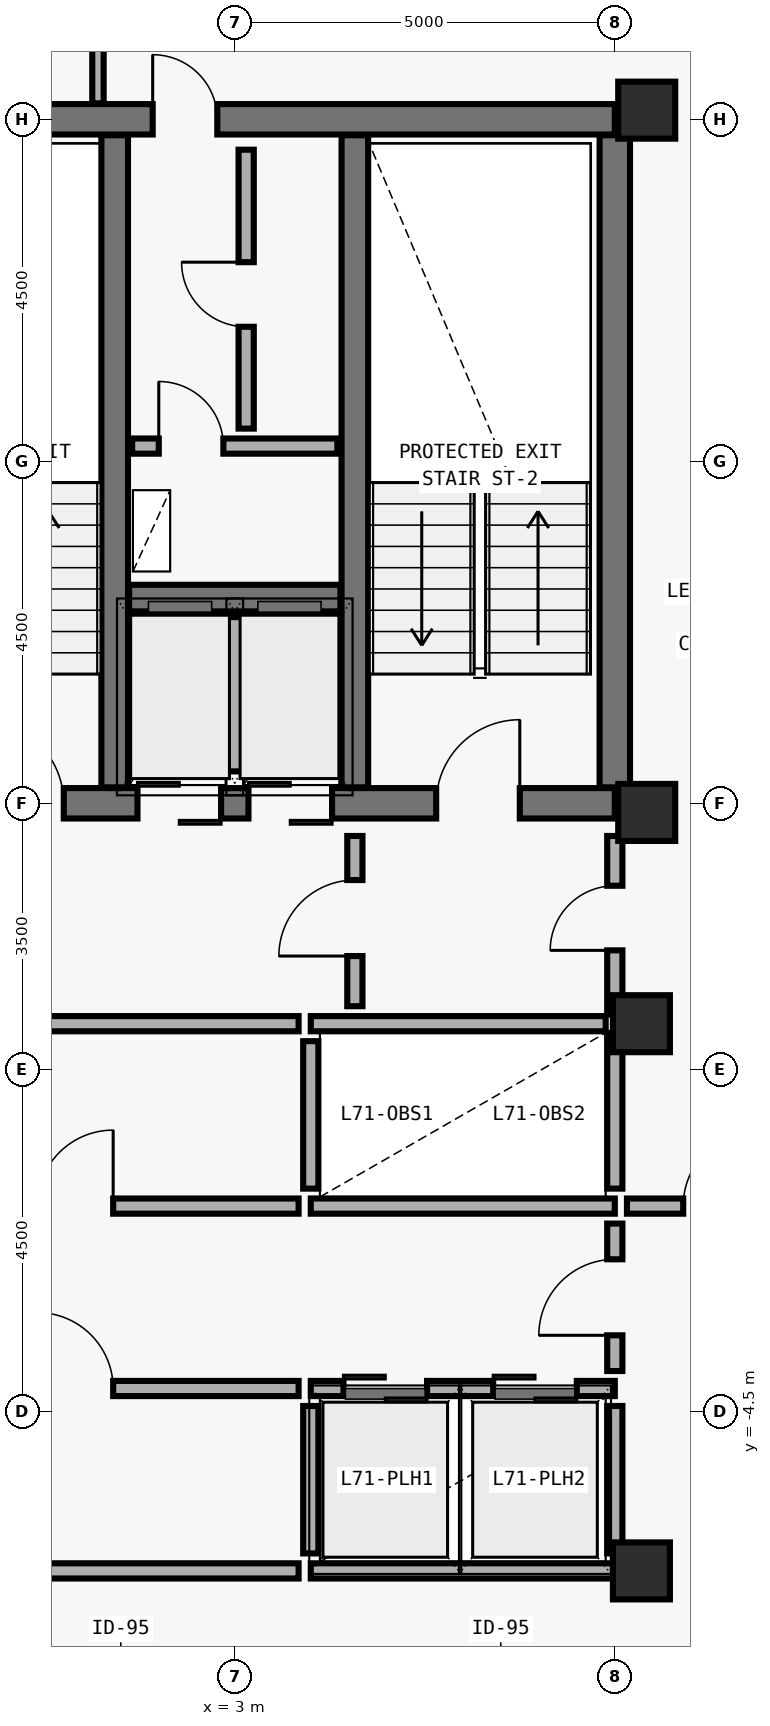
"""IFC4 building model, lengths in metres.
Left out: names, types, materials, properties, quantities, classifications, styles, units other than length and angle.
Written with IfcOpenShell. Run it as: python <this file> out.ifc"""

import sys

from ifc_helpers import new_model, si_unit, direction, frame, frame_2d, origin, origin_2d, place, context, subcontext, project, spatial, rectangle, extrude, element, fill, save


model = new_model("IFC4")
c1 = context("Model", 3, precision=1e-05, world=origin(), true_north=direction((0.0, 1.0)))
c2 = subcontext(c1, "Body", "Model", "MODEL_VIEW")
j1 = project(units=[si_unit("LENGTHUNIT", "METRE"), si_unit("PLANEANGLEUNIT", "RADIAN")], contexts=[c1])
p1 = place(None, origin())
s1 = spatial("IfcSite", under=j1, at=p1, CompositionType="ELEMENT")
p2 = place(p1, origin())
s2 = spatial("IfcBuilding", under=s1, at=p2, CompositionType="ELEMENT")
p3 = place(p2, frame((0.0, 0.0, 277.8)))
s3 = spatial("IfcBuildingStorey", under=s2, at=p3, CompositionType="ELEMENT", Elevation=277.8)
p4 = place(p3, frame((-2.0, 3.5, 0.0), z_axis=(0.0, 0.0, 1.0), x_axis=(1.0, 0.0, 0.0)))
e1 = element("IfcWall", 1, at=p4, inside=s3, PredefinedType="SHEAR", context=c2, shape_type="SweptSolid", body=[
    extrude(rectangle(XDim=10.0, YDim=0.4, at=frame_2d((5.0, 0.0))), origin(), (0.0, 0.0, 1.0), 3.592),
])
p5 = place(p4, frame((1.65, 0.0, 0.0)))
e2 = element("IfcOpeningElement", 2, at=p5, cuts=e1, PredefinedType="OPENING", context=c2, shape_type="SweptSolid", body=[
    extrude(rectangle(XDim=1.1, YDim=2.15, at=frame_2d((0.55, 1.075))), frame((0.0, 0.21, 0.0), z_axis=(0.0, -1.0, 0.0), x_axis=(1.0, 0.0, 0.0)), (0.0, 0.0, 1.0), 0.42),
])
p6 = place(p4, frame((7.65, 0.0, 0.0)))
e3 = element("IfcOpeningElement", 3, at=p6, cuts=e1, PredefinedType="OPENING", context=c2, shape_type="SweptSolid", body=[
    extrude(rectangle(XDim=1.1, YDim=2.15, at=frame_2d((0.55, 1.075))), frame((0.0, 0.21, 0.0), z_axis=(0.0, -1.0, 0.0), x_axis=(1.0, 0.0, 0.0)), (0.0, 0.0, 1.0), 0.42),
])
p7 = place(p4, frame((3.72, 0.0, 0.0)))
e4 = element("IfcOpeningElement", 4, at=p7, cuts=e1, PredefinedType="OPENING", context=c2, shape_type="SweptSolid", body=[
    extrude(rectangle(XDim=1.1, YDim=2.2, at=frame_2d((0.55, 1.1))), frame((0.0, 0.21, 0.0), z_axis=(0.0, -1.0, 0.0), x_axis=(1.0, 0.0, 0.0)), (0.0, 0.0, 1.0), 0.42),
])
p8 = place(p4, frame((5.18, 0.0, 0.0)))
e5 = element("IfcOpeningElement", 5, at=p8, cuts=e1, PredefinedType="OPENING", context=c2, shape_type="SweptSolid", body=[
    extrude(rectangle(XDim=1.1, YDim=2.2, at=frame_2d((0.55, 1.1))), frame((0.0, 0.21, 0.0), z_axis=(0.0, -1.0, 0.0), x_axis=(1.0, 0.0, 0.0)), (0.0, 0.0, 1.0), 0.42),
])
p9 = place(p3, frame((-2.0, 12.5, 0.0), z_axis=(0.0, 0.0, 1.0), x_axis=(1.0, 0.0, 0.0)))
e6 = element("IfcWall", 6, at=p9, inside=s3, PredefinedType="SHEAR", context=c2, shape_type="SweptSolid", body=[
    extrude(rectangle(XDim=10.0, YDim=0.4, at=frame_2d((5.0, 0.0))), origin(), (0.0, 0.0, 1.0), 3.592),
])
p10 = place(p9, frame((3.92, 0.0, 0.0)))
e7 = element("IfcOpeningElement", 7, at=p10, cuts=e6, PredefinedType="OPENING", context=c2, shape_type="SweptSolid", body=[
    extrude(rectangle(XDim=0.85, YDim=2.1, at=frame_2d((0.425, 1.05))), frame((0.0, 0.21, 0.0), z_axis=(0.0, -1.0, 0.0), x_axis=(1.0, 0.0, 0.0)), (0.0, 0.0, 1.0), 0.42),
])
p11 = place(p3, frame((8.0, 3.71, 0.0), z_axis=(0.0, 0.0, 1.0), x_axis=(0.0, 1.0, 0.0)))
e8 = element("IfcWall", 8, at=p11, inside=s3, PredefinedType="SHEAR", context=c2, shape_type="SweptSolid", body=[
    extrude(rectangle(XDim=8.58, YDim=0.4, at=frame_2d((4.29, 0.0))), origin(), (0.0, 0.0, 1.0), 3.592),
])
for number, where, z_axis, x_axis in (
    (9, (1.42, 3.71, 0.0), (0.0, 0.0, 1.0), (0.0, 1.0, 0.0)),
    (10, (4.58, 3.71, 0.0), (0.0, 0.0, 1.0), (0.0, 1.0, 0.0)),
):
    element("IfcWall", number, at=place(p3, frame(where, z_axis=z_axis, x_axis=x_axis)), inside=s3, PredefinedType="SHEAR", context=c2, shape_type="SweptSolid", body=[
        extrude(rectangle(XDim=8.58, YDim=0.35, at=frame_2d((4.29, 0.0))), origin(), (0.0, 0.0, 1.0), 3.592),
    ])
p12 = place(p3, frame((1.61, 6.2, 0.0), z_axis=(0.0, 0.0, 1.0), x_axis=(1.0, 0.0, 0.0)))
e11 = element("IfcWall", 11, at=p12, inside=s3, PredefinedType="SHEAR", context=c2, shape_type="SweptSolid", body=[
    extrude(rectangle(XDim=2.78, YDim=0.35, at=frame_2d((1.39, 0.0))), origin(), (0.0, 0.0, 1.0), 3.592),
])
for number, where, z_axis, x_axis in (
    (12, (8.42, 12.62, 0.0), (0.0, 0.0, 1.0), (1.0, 0.0, 0.0)),
    (13, (8.42, 3.38, 0.0), (0.0, 0.0, 1.0), (1.0, 0.0, 0.0)),
    (14, (8.35, 0.6, 0.0), (0.0, 0.0, 1.0), (1.0, 0.0, 0.0)),
    (15, (8.35, -6.6, 0.0), (0.0, 0.0, 1.0), (1.0, 0.0, 0.0)),
):
    element("IfcColumn", number, at=place(p3, frame(where, z_axis=z_axis, x_axis=x_axis)), inside=s3, PredefinedType="COLUMN", context=c2, shape_type="SweptSolid", body=[
        extrude(rectangle(XDim=0.75, YDim=0.75, at=origin_2d()), origin(), (0.0, 0.0, 1.0), 3.575),
    ])
p13 = place(p3, frame((3.0, 3.92, 0.0), z_axis=(0.0, 0.0, 1.0), x_axis=(0.0, 1.0, 0.0)))
e16 = element("IfcWall", 16, at=p13, inside=s3, PredefinedType="SOLIDWALL", context=c2, shape_type="SweptSolid", body=[
    extrude(rectangle(XDim=2.03, YDim=0.2, at=frame_2d((1.015, 0.0))), origin(), (0.0, 0.0, 1.0), 3.36),
])
p14 = place(p3, frame((4.0, 0.6, 0.0), z_axis=(0.0, 0.0, 1.0), x_axis=(1.0, 0.0, 0.0)))
e17 = element("IfcWall", 17, at=p14, inside=s3, PredefinedType="SOLIDWALL", context=c2, shape_type="SweptSolid", body=[
    extrude(rectangle(XDim=3.88, YDim=0.2, at=frame_2d((1.94, 0.0))), origin(), (0.0, 0.0, 1.0), 3.072),
])
p15 = place(p3, frame((4.0, -1.8, 0.0), z_axis=(0.0, 0.0, 1.0), x_axis=(1.0, 0.0, 0.0)))
e18 = element("IfcWall", 18, at=p15, inside=s3, PredefinedType="SOLIDWALL", context=c2, shape_type="SweptSolid", body=[
    extrude(rectangle(XDim=4.0, YDim=0.2, at=frame_2d((2.0, 0.0))), origin(), (0.0, 0.0, 1.0), 3.36),
])
p16 = place(p3, frame((4.0, -1.57, 0.0), z_axis=(0.0, 0.0, 1.0), x_axis=(0.0, 1.0, 0.0)))
e19 = element("IfcWall", 19, at=p16, inside=s3, PredefinedType="SOLIDWALL", context=c2, shape_type="SweptSolid", body=[
    extrude(rectangle(XDim=1.94, YDim=0.2, at=frame_2d((0.97, 0.0))), origin(), (0.0, 0.0, 1.0), 3.36),
])
p17 = place(p3, frame((8.0, -1.57, 0.0), z_axis=(0.0, 0.0, 1.0), x_axis=(0.0, 1.0, 0.0)))
e20 = element("IfcWall", 20, at=p17, inside=s3, PredefinedType="SOLIDWALL", context=c2, shape_type="SweptSolid", body=[
    extrude(rectangle(XDim=2.05, YDim=0.2, at=frame_2d((1.025, 0.0))), origin(), (0.0, 0.0, 1.0), 3.072),
])
p18 = place(p3, frame((4.0, -4.2, 0.0), z_axis=(0.0, 0.0, 1.0), x_axis=(1.0, 0.0, 0.0)))
e21 = element("IfcWall", 21, at=p18, inside=s3, PredefinedType="SOLIDWALL", context=c2, shape_type="SweptSolid", body=[
    extrude(rectangle(XDim=4.0, YDim=0.2, at=frame_2d((2.0, 0.0))), origin(), (0.0, 0.0, 1.0), 3.36),
])
p19 = place(p18, frame((0.43, 0.0, 0.0)))
e22 = element("IfcOpeningElement", 22, at=p19, cuts=e21, PredefinedType="OPENING", context=c2, shape_type="SweptSolid", body=[
    extrude(rectangle(XDim=1.1, YDim=2.2, at=frame_2d((0.55, 1.1))), frame((0.0, 0.11, 0.0), z_axis=(0.0, -1.0, 0.0), x_axis=(1.0, 0.0, 0.0)), (0.0, 0.0, 1.0), 0.22),
])
p20 = place(p18, frame((2.4, 0.0, 0.0)))
e23 = element("IfcOpeningElement", 23, at=p20, cuts=e21, PredefinedType="OPENING", context=c2, shape_type="SweptSolid", body=[
    extrude(rectangle(XDim=1.1, YDim=2.2, at=frame_2d((0.55, 1.1))), frame((0.0, 0.11, 0.0), z_axis=(0.0, -1.0, 0.0), x_axis=(1.0, 0.0, 0.0)), (0.0, 0.0, 1.0), 0.22),
])
p21 = place(p3, frame((4.0, -6.6, 0.0), z_axis=(0.0, 0.0, 1.0), x_axis=(1.0, 0.0, 0.0)))
e24 = element("IfcWall", 24, at=p21, inside=s3, PredefinedType="SOLIDWALL", context=c2, shape_type="SweptSolid", body=[
    extrude(rectangle(XDim=4.0, YDim=0.2, at=frame_2d((2.0, 0.0))), origin(), (0.0, 0.0, 1.0), 3.072),
])
p22 = place(p3, frame((4.0, -6.37, 0.0), z_axis=(0.0, 0.0, 1.0), x_axis=(0.0, 1.0, 0.0)))
e25 = element("IfcWall", 25, at=p22, inside=s3, PredefinedType="SOLIDWALL", context=c2, shape_type="SweptSolid", body=[
    extrude(rectangle(XDim=1.94, YDim=0.2, at=frame_2d((0.97, 0.0))), origin(), (0.0, 0.0, 1.0), 3.36),
])
p23 = place(p3, frame((8.0, -6.37, 0.0), z_axis=(0.0, 0.0, 1.0), x_axis=(0.0, 1.0, 0.0)))
e26 = element("IfcWall", 26, at=p23, inside=s3, PredefinedType="SOLIDWALL", context=c2, shape_type="SweptSolid", body=[
    extrude(rectangle(XDim=1.94, YDim=0.2, at=frame_2d((0.97, 0.0))), origin(), (0.0, 0.0, 1.0), 3.072),
])
p24 = place(p3, frame((1.65, 8.2, 0.0), z_axis=(0.0, 0.0, 1.0), x_axis=(1.0, 0.0, 0.0)))
e27 = element("IfcWall", 27, at=p24, inside=s3, PredefinedType="MOVABLE", context=c2, shape_type="SweptSolid", body=[
    extrude(rectangle(XDim=2.7, YDim=0.2, at=frame_2d((1.35, 0.0))), origin(), (0.0, 0.0, 1.0), 3.36),
])
p25 = place(p24, frame((0.35, 0.0, 0.0)))
e28 = element("IfcOpeningElement", 28, at=p25, cuts=e27, PredefinedType="OPENING", context=c2, shape_type="SweptSolid", body=[
    extrude(rectangle(XDim=0.85, YDim=2.1, at=frame_2d((0.425, 1.05))), frame((0.0, 0.11, 0.0), z_axis=(0.0, -1.0, 0.0), x_axis=(1.0, 0.0, 0.0)), (0.0, 0.0, 1.0), 0.22),
])
p26 = place(p3, frame((3.15, 8.43, 0.0), z_axis=(0.0, 0.0, 1.0), x_axis=(0.0, 1.0, 0.0)))
e29 = element("IfcWall", 29, at=p26, inside=s3, PredefinedType="MOVABLE", context=c2, shape_type="SweptSolid", body=[
    extrude(rectangle(XDim=3.67, YDim=0.2, at=frame_2d((1.835, 0.0))), origin(), (0.0, 0.0, 1.0), 3.36),
])
p27 = place(p26, frame((1.34, 0.0, 0.0)))
e30 = element("IfcOpeningElement", 30, at=p27, cuts=e29, PredefinedType="OPENING", context=c2, shape_type="SweptSolid", body=[
    extrude(rectangle(XDim=0.85, YDim=2.1, at=frame_2d((0.425, 1.05))), frame((0.0, 0.11, 0.0), z_axis=(0.0, -1.0, 0.0), x_axis=(1.0, 0.0, 0.0)), (0.0, 0.0, 1.0), 0.22),
])
p28 = place(p3, frame((4.58, 0.83, 0.0), z_axis=(0.0, 0.0, 1.0), x_axis=(0.0, 1.0, 0.0)))
e31 = element("IfcWall", 31, at=p28, inside=s3, PredefinedType="MOVABLE", context=c2, shape_type="SweptSolid", body=[
    extrude(rectangle(XDim=2.24, YDim=0.2, at=frame_2d((1.12, 0.0))), origin(), (0.0, 0.0, 1.0), 3.36),
])
p29 = place(p28, frame((0.66, 0.0, 0.0)))
e32 = element("IfcOpeningElement", 32, at=p29, cuts=e31, PredefinedType="OPENING", context=c2, shape_type="SweptSolid", body=[
    extrude(rectangle(XDim=1.0, YDim=2.1, at=frame_2d((0.5, 1.05))), frame((0.0, 0.11, 0.0), z_axis=(0.0, -1.0, 0.0), x_axis=(1.0, 0.0, 0.0)), (0.0, 0.0, 1.0), 0.22),
])
p30 = place(p3, frame((8.0, 0.72, 0.0), z_axis=(0.0, 0.0, 1.0), x_axis=(0.0, 1.0, 0.0)))
e33 = element("IfcWall", 33, at=p30, inside=s3, PredefinedType="MOVABLE", context=c2, shape_type="SweptSolid", body=[
    extrude(rectangle(XDim=2.35, YDim=0.2, at=frame_2d((1.175, 0.0))), origin(), (0.0, 0.0, 1.0), 2.692),
])
p31 = place(p30, frame((0.845, 0.0, 0.0)))
e34 = element("IfcOpeningElement", 34, at=p31, cuts=e33, PredefinedType="OPENING", context=c2, shape_type="SweptSolid", body=[
    extrude(rectangle(XDim=0.85, YDim=2.1, at=frame_2d((0.425, 1.05))), frame((0.0, 0.11, 0.0), z_axis=(0.0, -1.0, 0.0), x_axis=(1.0, 0.0, 0.0)), (0.0, 0.0, 1.0), 0.22),
])
p32 = place(p3, frame((8.0, -3.97, 0.0), z_axis=(0.0, 0.0, 1.0), x_axis=(0.0, 1.0, 0.0)))
e35 = element("IfcWall", 35, at=p32, inside=s3, PredefinedType="MOVABLE", context=c2, shape_type="SweptSolid", body=[
    extrude(rectangle(XDim=1.94, YDim=0.2, at=frame_2d((0.97, 0.0))), origin(), (0.0, 0.0, 1.0), 3.072),
])
p33 = place(p32, frame((0.47, 0.0, 0.0)))
e36 = element("IfcOpeningElement", 36, at=p33, cuts=e35, PredefinedType="OPENING", context=c2, shape_type="SweptSolid", body=[
    extrude(rectangle(XDim=1.0, YDim=2.1, at=frame_2d((0.5, 1.05))), frame((0.0, 0.11, 0.0), z_axis=(0.0, -1.0, 0.0), x_axis=(1.0, 0.0, 0.0)), (0.0, 0.0, 1.0), 0.22),
])
p34 = place(p3, frame((-1.89, -1.8, 0.0), z_axis=(0.0, 0.0, 1.0), x_axis=(1.0, 0.0, 0.0)))
e37 = element("IfcWall", 37, at=p34, inside=s3, PredefinedType="MOVABLE", context=c2, shape_type="SweptSolid", body=[
    extrude(rectangle(XDim=5.73, YDim=0.2, at=frame_2d((2.865, 0.0))), origin(), (0.0, 0.0, 1.0), 3.36),
])
p35 = place(p34, frame((2.29, 0.0, 0.0)))
e38 = element("IfcOpeningElement", 38, at=p35, cuts=e37, PredefinedType="OPENING", context=c2, shape_type="SweptSolid", body=[
    extrude(rectangle(XDim=1.0, YDim=2.1, at=frame_2d((0.5, 1.05))), frame((0.0, 0.11, 0.0), z_axis=(0.0, -1.0, 0.0), x_axis=(1.0, 0.0, 0.0)), (0.0, 0.0, 1.0), 0.22),
])
p36 = place(p3, frame((-1.89, -4.2, 0.0), z_axis=(0.0, 0.0, 1.0), x_axis=(1.0, 0.0, 0.0)))
e39 = element("IfcWall", 39, at=p36, inside=s3, PredefinedType="MOVABLE", context=c2, shape_type="SweptSolid", body=[
    extrude(rectangle(XDim=5.73, YDim=0.2, at=frame_2d((2.865, 0.0))), origin(), (0.0, 0.0, 1.0), 3.36),
])
p37 = place(p36, frame((2.29, 0.0, 0.0)))
e40 = element("IfcOpeningElement", 40, at=p37, cuts=e39, PredefinedType="OPENING", context=c2, shape_type="SweptSolid", body=[
    extrude(rectangle(XDim=1.0, YDim=2.1, at=frame_2d((0.5, 1.05))), frame((0.0, 0.11, 0.0), z_axis=(0.0, -1.0, 0.0), x_axis=(1.0, 0.0, 0.0)), (0.0, 0.0, 1.0), 0.22),
])
p38 = place(p3, frame((8.16, -1.8, 0.0), z_axis=(0.0, 0.0, 1.0), x_axis=(1.0, 0.0, 0.0)))
e41 = element("IfcWall", 41, at=p38, inside=s3, PredefinedType="MOVABLE", context=c2, shape_type="SweptSolid", body=[
    extrude(rectangle(XDim=2.64, YDim=0.2, at=frame_2d((1.32, 0.0))), origin(), (0.0, 0.0, 1.0), 3.36),
])
p39 = place(p38, frame((0.74, 0.0, 0.0)))
e42 = element("IfcOpeningElement", 42, at=p39, cuts=e41, PredefinedType="OPENING", context=c2, shape_type="SweptSolid", body=[
    extrude(rectangle(XDim=1.0, YDim=2.1, at=frame_2d((0.5, 1.05))), frame((0.0, 0.11, 0.0), z_axis=(0.0, -1.0, 0.0), x_axis=(1.0, 0.0, 0.0)), (0.0, 0.0, 1.0), 0.22),
])
p40 = place(p3, frame((-1.88, 0.6, 0.0), z_axis=(0.0, 0.0, 1.0), x_axis=(1.0, 0.0, 0.0)))
e43 = element("IfcWall", 43, at=p40, inside=s3, PredefinedType="MOVABLE", context=c2, shape_type="SweptSolid", body=[
    extrude(rectangle(XDim=5.72, YDim=0.2, at=frame_2d((2.86, 0.0))), origin(), (0.0, 0.0, 1.0), 3.072),
])
p41 = place(p3, frame((-2.0, -6.6, 0.0), z_axis=(0.0, 0.0, 1.0), x_axis=(1.0, 0.0, 0.0)))
e44 = element("IfcWall", 44, at=p41, inside=s3, PredefinedType="MOVABLE", context=c2, shape_type="SweptSolid", body=[
    extrude(rectangle(XDim=5.84, YDim=0.2, at=frame_2d((2.92, 0.0))), origin(), (0.0, 0.0, 1.0), 3.072),
])
p42 = place(p3, frame((1.2, 14.615, 0.0), z_axis=(0.0, 0.0, 1.0), x_axis=(0.0, -1.0, 0.0)))
e45 = element("IfcWall", 45, at=p42, inside=s3, PredefinedType="PARTITIONING", context=c2, shape_type="SweptSolid", body=[
    extrude(rectangle(XDim=1.905, YDim=0.15, at=frame_2d((0.953, 0.0))), origin(), (0.0, 0.0, 1.0), 3.36),
])
p43 = place(p5, origin())
e46 = element("IfcDoor", 46, at=p43, inside=s3, OperationType="SINGLE_SWING_LEFT", PredefinedType="DOOR", context=c2, shape_type="SweptSolid", body=[
    extrude(rectangle(XDim=1.1, YDim=2.15, at=frame_2d((0.55, 1.075))), frame((0.0, 0.025, 0.0), z_axis=(0.0, -1.0, 0.0), x_axis=(1.0, 0.0, 0.0)), (0.0, 0.0, 1.0), 0.05),
])
fill(e2, e46)
p44 = place(p6, origin())
e47 = element("IfcDoor", 47, at=p44, inside=s3, OperationType="SINGLE_SWING_RIGHT", PredefinedType="DOOR", context=c2, shape_type="SweptSolid", body=[
    extrude(rectangle(XDim=1.1, YDim=2.15, at=frame_2d((0.55, 1.075))), frame((0.0, 0.025, 0.0), z_axis=(0.0, -1.0, 0.0), x_axis=(1.0, 0.0, 0.0)), (0.0, 0.0, 1.0), 0.05),
])
fill(e3, e47)
p45 = place(p7, origin())
e48 = element("IfcDoor", 48, at=p45, inside=s3, OperationType="DOUBLE_DOOR_SLIDING", PredefinedType="DOOR", context=c2, shape_type="SweptSolid", body=[
    extrude(rectangle(XDim=1.1, YDim=2.2, at=frame_2d((0.55, 1.1))), frame((0.0, 0.025, 0.0), z_axis=(0.0, -1.0, 0.0), x_axis=(1.0, 0.0, 0.0)), (0.0, 0.0, 1.0), 0.05),
])
fill(e4, e48)
p46 = place(p8, origin())
e49 = element("IfcDoor", 49, at=p46, inside=s3, OperationType="DOUBLE_DOOR_SLIDING", PredefinedType="DOOR", context=c2, shape_type="SweptSolid", body=[
    extrude(rectangle(XDim=1.1, YDim=2.2, at=frame_2d((0.55, 1.1))), frame((0.0, 0.025, 0.0), z_axis=(0.0, -1.0, 0.0), x_axis=(1.0, 0.0, 0.0)), (0.0, 0.0, 1.0), 0.05),
])
fill(e5, e49)
p47 = place(p10, origin())
e50 = element("IfcDoor", 50, at=p47, inside=s3, OperationType="SINGLE_SWING_LEFT", PredefinedType="DOOR", context=c2, shape_type="SweptSolid", body=[
    extrude(rectangle(XDim=0.85, YDim=2.1, at=frame_2d((0.425, 1.05))), frame((0.0, 0.025, 0.0), z_axis=(0.0, -1.0, 0.0), x_axis=(1.0, 0.0, 0.0)), (0.0, 0.0, 1.0), 0.05),
])
fill(e7, e50)
p48 = place(p25, origin())
e51 = element("IfcDoor", 51, at=p48, inside=s3, OperationType="SINGLE_SWING_LEFT", PredefinedType="DOOR", context=c2, shape_type="SweptSolid", body=[
    extrude(rectangle(XDim=0.85, YDim=2.1, at=frame_2d((0.425, 1.05))), frame((0.0, 0.025, 0.0), z_axis=(0.0, -1.0, 0.0), x_axis=(1.0, 0.0, 0.0)), (0.0, 0.0, 1.0), 0.05),
])
fill(e28, e51)
p49 = place(p27, origin())
e52 = element("IfcDoor", 52, at=p49, inside=s3, OperationType="SINGLE_SWING_RIGHT", PredefinedType="DOOR", context=c2, shape_type="SweptSolid", body=[
    extrude(rectangle(XDim=0.85, YDim=2.1, at=frame_2d((0.425, 1.05))), frame((0.0, 0.025, 0.0), z_axis=(0.0, -1.0, 0.0), x_axis=(1.0, 0.0, 0.0)), (0.0, 0.0, 1.0), 0.05),
])
fill(e30, e52)
p50 = place(p29, origin())
e53 = element("IfcDoor", 53, at=p50, inside=s3, OperationType="SINGLE_SWING_LEFT", PredefinedType="DOOR", context=c2, shape_type="SweptSolid", body=[
    extrude(rectangle(XDim=1.0, YDim=2.1, at=frame_2d((0.5, 1.05))), frame((0.0, 0.025, 0.0), z_axis=(0.0, -1.0, 0.0), x_axis=(1.0, 0.0, 0.0)), (0.0, 0.0, 1.0), 0.05),
])
fill(e32, e53)
p51 = place(p31, origin())
e54 = element("IfcDoor", 54, at=p51, inside=s3, OperationType="SINGLE_SWING_LEFT", PredefinedType="DOOR", context=c2, shape_type="SweptSolid", body=[
    extrude(rectangle(XDim=0.85, YDim=2.1, at=frame_2d((0.425, 1.05))), frame((0.0, 0.025, 0.0), z_axis=(0.0, -1.0, 0.0), x_axis=(1.0, 0.0, 0.0)), (0.0, 0.0, 1.0), 0.05),
])
fill(e34, e54)
p52 = place(p33, origin())
e55 = element("IfcDoor", 55, at=p52, inside=s3, OperationType="SINGLE_SWING_LEFT", PredefinedType="DOOR", context=c2, shape_type="SweptSolid", body=[
    extrude(rectangle(XDim=1.0, YDim=2.1, at=frame_2d((0.5, 1.05))), frame((0.0, 0.025, 0.0), z_axis=(0.0, -1.0, 0.0), x_axis=(1.0, 0.0, 0.0)), (0.0, 0.0, 1.0), 0.05),
])
fill(e36, e55)
p53 = place(p35, origin())
e56 = element("IfcDoor", 56, at=p53, inside=s3, OperationType="SINGLE_SWING_RIGHT", PredefinedType="DOOR", context=c2, shape_type="SweptSolid", body=[
    extrude(rectangle(XDim=1.0, YDim=2.1, at=frame_2d((0.5, 1.05))), frame((0.0, 0.025, 0.0), z_axis=(0.0, -1.0, 0.0), x_axis=(1.0, 0.0, 0.0)), (0.0, 0.0, 1.0), 0.05),
])
fill(e38, e56)
p54 = place(p37, origin())
e57 = element("IfcDoor", 57, at=p54, inside=s3, OperationType="SINGLE_SWING_LEFT", PredefinedType="DOOR", context=c2, shape_type="SweptSolid", body=[
    extrude(rectangle(XDim=1.0, YDim=2.1, at=frame_2d((0.5, 1.05))), frame((0.0, 0.025, 0.0), z_axis=(0.0, -1.0, 0.0), x_axis=(1.0, 0.0, 0.0)), (0.0, 0.0, 1.0), 0.05),
])
fill(e40, e57)
p55 = place(p39, origin())
e58 = element("IfcDoor", 58, at=p55, inside=s3, OperationType="SINGLE_SWING_RIGHT", PredefinedType="DOOR", context=c2, shape_type="SweptSolid", body=[
    extrude(rectangle(XDim=1.0, YDim=2.1, at=frame_2d((0.5, 1.05))), frame((0.0, 0.025, 0.0), z_axis=(0.0, -1.0, 0.0), x_axis=(1.0, 0.0, 0.0)), (0.0, 0.0, 1.0), 0.05),
])
fill(e42, e58)
p56 = place(p19, origin())
e59 = element("IfcDoor", 59, at=p56, inside=s3, OperationType="DOUBLE_DOOR_SLIDING", PredefinedType="DOOR", context=c2, shape_type="SweptSolid", body=[
    extrude(rectangle(XDim=1.1, YDim=2.2, at=frame_2d((0.55, 1.1))), frame((0.0, 0.025, 0.0), z_axis=(0.0, -1.0, 0.0), x_axis=(1.0, 0.0, 0.0)), (0.0, 0.0, 1.0), 0.05),
])
fill(e22, e59)
p57 = place(p20, origin())
e60 = element("IfcDoor", 60, at=p57, inside=s3, OperationType="DOUBLE_DOOR_SLIDING", PredefinedType="DOOR", context=c2, shape_type="SweptSolid", body=[
    extrude(rectangle(XDim=1.1, YDim=2.2, at=frame_2d((0.55, 1.1))), frame((0.0, 0.025, 0.0), z_axis=(0.0, -1.0, 0.0), x_axis=(1.0, 0.0, 0.0)), (0.0, 0.0, 1.0), 0.05),
])
fill(e23, e60)
save(model, sys.argv[1])
